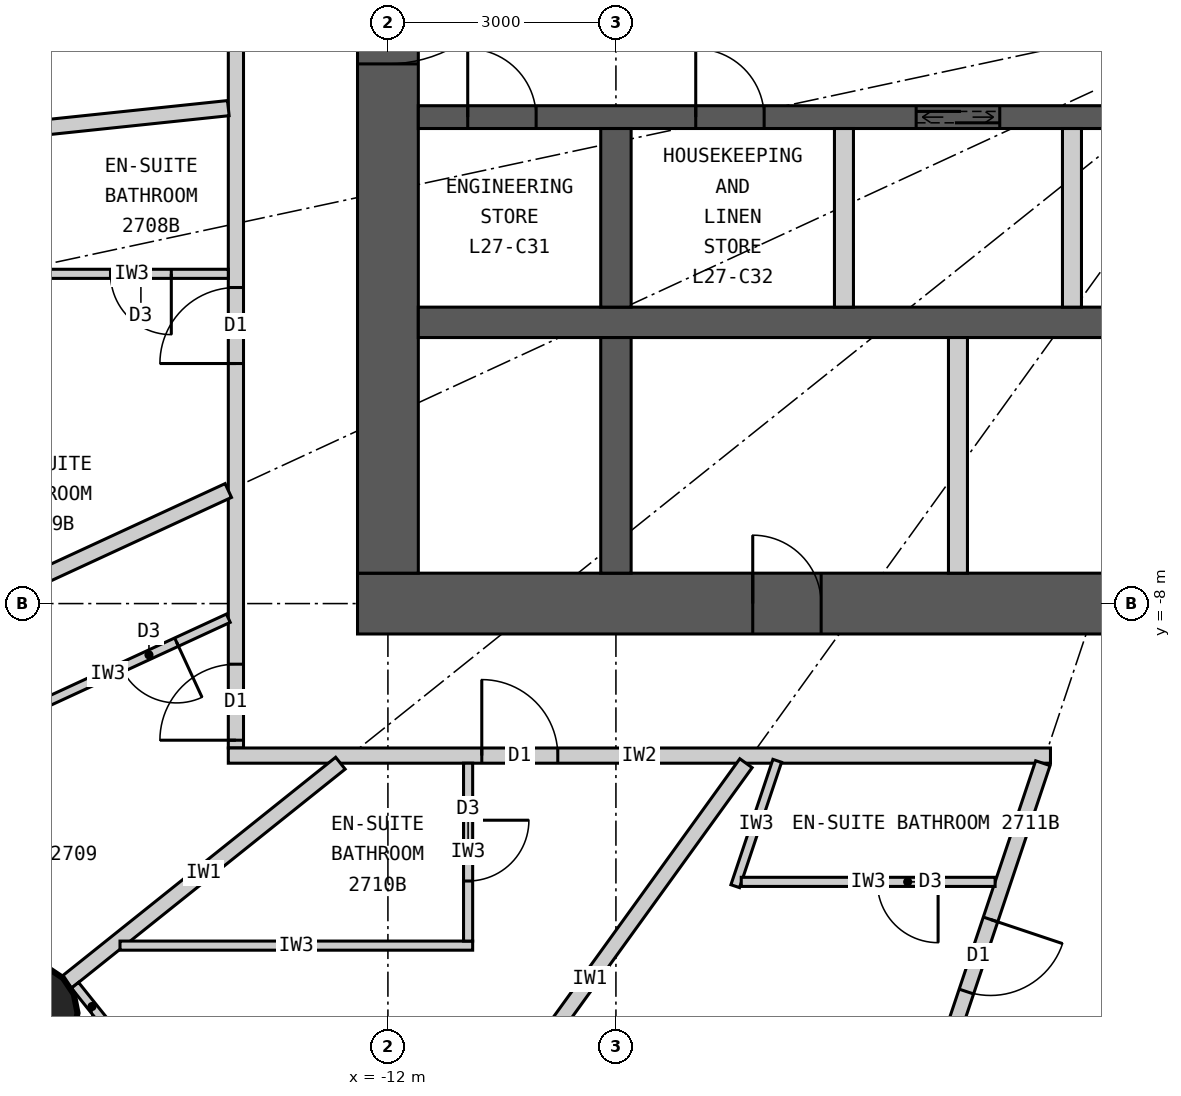
"""IFC4 building model, lengths in metres.
Left out: names, types, materials, properties, quantities, classifications, styles, units other than length and angle.
Written with IfcOpenShell. Run it as: python <this file> out.ifc"""

import sys

from ifc_helpers import new_model, si_unit, direction, frame, frame_2d, origin, origin_2d, place, context, subcontext, project, spatial, rectangle, circle, extrude, element, fill, save


model = new_model("IFC4")
c1 = context("Model", 3, precision=1e-05, world=origin(), true_north=direction((0.0, 1.0)))
c2 = subcontext(c1, "Body", "Model", "MODEL_VIEW")
j1 = project(units=[si_unit("LENGTHUNIT", "METRE"), si_unit("PLANEANGLEUNIT", "RADIAN")], contexts=[c1])
p1 = place(None, origin())
s1 = spatial("IfcSite", under=j1, at=p1, CompositionType="ELEMENT")
p2 = place(p1, origin())
s2 = spatial("IfcBuilding", under=s1, at=p2, CompositionType="ELEMENT")
p3 = place(p2, frame((0.0, 0.0, 108.9)))
s3 = spatial("IfcBuildingStorey", under=s2, at=p3, CompositionType="ELEMENT", Elevation=108.9)
p4 = place(p3, frame((-16.734, -13.387, 0.0), z_axis=(0.0, 0.0, 1.0), x_axis=(1.0, 0.0, 0.0)))
e1 = element("IfcColumn", 1, at=p4, inside=s3, PredefinedType="COLUMN", context=c2, shape_type="SweptSolid", body=[
    extrude(circle(Radius=0.65, at=origin_2d()), origin(), (0.0, 0.0, 1.0), 3.3),
])
p5 = place(p3, frame((12.4, -8.0, 0.0), z_axis=(0.0, 0.0, 1.0), x_axis=(-1.0, 0.0, 0.0)))
e2 = element("IfcWall", 2, at=p5, inside=s3, PredefinedType="SHEAR", context=c2, shape_type="SweptSolid", body=[
    extrude(rectangle(XDim=24.8, YDim=0.8, at=frame_2d((12.4, 0.0))), origin(), (0.0, 0.0, 1.0), 3.3),
])
p6 = place(p5, frame((11.1, 0.0, 0.0)))
e3 = element("IfcOpeningElement", 3, at=p6, cuts=e2, PredefinedType="OPENING", context=c2, shape_type="SweptSolid", body=[
    extrude(rectangle(XDim=1.2, YDim=2.2, at=frame_2d((0.6, 1.1))), frame((0.0, 0.41, 0.0), z_axis=(0.0, -1.0, 0.0), x_axis=(1.0, 0.0, 0.0)), (0.0, 0.0, 1.0), 0.82),
])
p7 = place(p5, frame((18.7, 0.0, 0.0)))
e4 = element("IfcOpeningElement", 4, at=p7, cuts=e2, PredefinedType="OPENING", context=c2, shape_type="SweptSolid", body=[
    extrude(rectangle(XDim=0.9, YDim=2.2, at=frame_2d((0.45, 1.1))), frame((0.0, 0.41, 0.0), z_axis=(0.0, -1.0, 0.0), x_axis=(1.0, 0.0, 0.0)), (0.0, 0.0, 1.0), 0.82),
])
p8 = place(p3, frame((-12.0, 7.6, 0.0), z_axis=(0.0, 0.0, 1.0), x_axis=(0.0, -1.0, 0.0)))
e5 = element("IfcWall", 5, at=p8, inside=s3, PredefinedType="SHEAR", context=c2, shape_type="SweptSolid", body=[
    extrude(rectangle(XDim=15.2, YDim=0.8, at=frame_2d((7.6, 0.0))), origin(), (0.0, 0.0, 1.0), 3.3),
])
p9 = place(p8, frame((6.7, 0.0, 0.0)))
e6 = element("IfcOpeningElement", 6, at=p9, cuts=e5, PredefinedType="OPENING", context=c2, shape_type="SweptSolid", body=[
    extrude(rectangle(XDim=1.8, YDim=2.2, at=frame_2d((0.9, 1.1))), frame((0.0, 0.41, 0.0), z_axis=(0.0, -1.0, 0.0), x_axis=(1.0, 0.0, 0.0)), (0.0, 0.0, 1.0), 0.82),
])
p10 = place(p3, frame((-11.6, -4.3, 0.0), z_axis=(0.0, 0.0, 1.0), x_axis=(1.0, 0.0, 0.0)))
e7 = element("IfcWall", 7, at=p10, inside=s3, PredefinedType="SHEAR", context=c2, shape_type="SweptSolid", body=[
    extrude(rectangle(XDim=23.2, YDim=0.4, at=frame_2d((11.6, 0.0))), origin(), (0.0, 0.0, 1.0), 3.3),
])
p11 = place(p3, frame((-11.6, -1.6, 0.0), z_axis=(0.0, 0.0, 1.0), x_axis=(1.0, 0.0, 0.0)))
e8 = element("IfcWall", 8, at=p11, inside=s3, PredefinedType="SHEAR", context=c2, shape_type="SweptSolid", body=[
    extrude(rectangle(XDim=23.2, YDim=0.3, at=frame_2d((11.6, 0.0))), origin(), (0.0, 0.0, 1.0), 3.3),
])
p12 = place(p11, frame((6.55, 0.0, 0.0)))
e9 = element("IfcOpeningElement", 9, at=p12, cuts=e8, PredefinedType="OPENING", context=c2, shape_type="SweptSolid", body=[
    extrude(rectangle(XDim=1.1, YDim=2.2, at=frame_2d((0.55, 1.1))), frame((0.0, 0.16, 0.0), z_axis=(0.0, -1.0, 0.0), x_axis=(1.0, 0.0, 0.0)), (0.0, 0.0, 1.0), 0.32),
])
p13 = place(p11, frame((15.3, 0.0, 0.0)))
e10 = element("IfcOpeningElement", 10, at=p13, cuts=e8, PredefinedType="OPENING", context=c2, shape_type="SweptSolid", body=[
    extrude(rectangle(XDim=1.6, YDim=2.4, at=frame_2d((0.8, 1.2))), frame((0.0, 0.16, 0.0), z_axis=(0.0, -1.0, 0.0), x_axis=(1.0, 0.0, 0.0)), (0.0, 0.0, 1.0), 0.32),
])
p14 = place(p11, frame((0.65, 0.0, 0.0)))
e11 = element("IfcOpeningElement", 11, at=p14, cuts=e8, PredefinedType="OPENING", context=c2, shape_type="SweptSolid", body=[
    extrude(rectangle(XDim=0.9, YDim=2.2, at=frame_2d((0.45, 1.1))), frame((0.0, 0.16, 0.0), z_axis=(0.0, -1.0, 0.0), x_axis=(1.0, 0.0, 0.0)), (0.0, 0.0, 1.0), 0.32),
])
p15 = place(p11, frame((3.65, 0.0, 0.0)))
e12 = element("IfcOpeningElement", 12, at=p15, cuts=e8, PredefinedType="OPENING", context=c2, shape_type="SweptSolid", body=[
    extrude(rectangle(XDim=0.9, YDim=2.2, at=frame_2d((0.45, 1.1))), frame((0.0, 0.16, 0.0), z_axis=(0.0, -1.0, 0.0), x_axis=(1.0, 0.0, 0.0)), (0.0, 0.0, 1.0), 0.32),
])
p16 = place(p11, frame((21.65, 0.0, 0.0)))
e13 = element("IfcOpeningElement", 13, at=p16, cuts=e8, PredefinedType="OPENING", context=c2, shape_type="SweptSolid", body=[
    extrude(rectangle(XDim=0.9, YDim=2.2, at=frame_2d((0.45, 1.1))), frame((0.0, 0.16, 0.0), z_axis=(0.0, -1.0, 0.0), x_axis=(1.0, 0.0, 0.0)), (0.0, 0.0, 1.0), 0.32),
])
p17 = place(p3, frame((-9.0, -4.1, 0.0), z_axis=(0.0, 0.0, 1.0), x_axis=(0.0, 1.0, 0.0)))
e14 = element("IfcWall", 14, at=p17, inside=s3, PredefinedType="SHEAR", context=c2, shape_type="SweptSolid", body=[
    extrude(rectangle(XDim=2.35, YDim=0.4, at=frame_2d((1.175, 0.0))), origin(), (0.0, 0.0, 1.0), 3.3),
])
p18 = place(p3, frame((-9.0, -7.6, 0.0), z_axis=(0.0, 0.0, 1.0), x_axis=(0.0, 1.0, 0.0)))
e15 = element("IfcWall", 15, at=p18, inside=s3, PredefinedType="SHEAR", context=c2, shape_type="SweptSolid", body=[
    extrude(rectangle(XDim=3.1, YDim=0.4, at=frame_2d((1.55, 0.0))), origin(), (0.0, 0.0, 1.0), 3.3),
])
p19 = place(p3, frame((-4.5, -7.6, 0.0), z_axis=(0.0, 0.0, 1.0), x_axis=(0.0, 1.0, 0.0)))
e16 = element("IfcWall", 16, at=p19, inside=s3, PredefinedType="PARTITIONING", context=c2, shape_type="SweptSolid", body=[
    extrude(rectangle(XDim=3.1, YDim=0.25, at=frame_2d((1.55, 0.0))), origin(), (0.0, 0.0, 1.0), 3.3),
])
for number, where, z_axis, x_axis in (
    (17, (-6.0, -4.1, 0.0), (0.0, 0.0, 1.0), (0.0, 1.0, 0.0)),
    (18, (-3.0, -4.1, 0.0), (0.0, 0.0, 1.0), (0.0, 1.0, 0.0)),
):
    element("IfcWall", number, at=place(p3, frame(where, z_axis=z_axis, x_axis=x_axis)), inside=s3, PredefinedType="PARTITIONING", context=c2, shape_type="SweptSolid", body=[
        extrude(rectangle(XDim=2.35, YDim=0.25, at=frame_2d((1.175, 0.0))), origin(), (0.0, 0.0, 1.0), 3.3),
    ])
p20 = place(p3, frame((-14.0, 9.9, 0.0), z_axis=(0.0, 0.0, 1.0), x_axis=(0.0, -1.0, 0.0)))
e19 = element("IfcWall", 19, at=p20, inside=s3, PredefinedType="PARTITIONING", context=c2, shape_type="SweptSolid", body=[
    extrude(rectangle(XDim=19.8, YDim=0.2, at=frame_2d((9.9, 0.0))), origin(), (0.0, 0.0, 1.0), 3.12),
])
p21 = place(p20, frame((3.622, 0.0, 0.0)))
e20 = element("IfcOpeningElement", 20, at=p21, cuts=e19, PredefinedType="OPENING", context=c2, shape_type="SweptSolid", body=[
    extrude(rectangle(XDim=1.0, YDim=2.2, at=frame_2d((0.5, 1.1))), frame((0.0, 0.11, 0.0), z_axis=(0.0, -1.0, 0.0), x_axis=(1.0, 0.0, 0.0)), (0.0, 0.0, 1.0), 0.22),
])
p22 = place(p20, frame((9.238, 0.0, 0.0)))
e21 = element("IfcOpeningElement", 21, at=p22, cuts=e19, PredefinedType="OPENING", context=c2, shape_type="SweptSolid", body=[
    extrude(rectangle(XDim=1.0, YDim=2.2, at=frame_2d((0.5, 1.1))), frame((0.0, 0.11, 0.0), z_axis=(0.0, -1.0, 0.0), x_axis=(1.0, 0.0, 0.0)), (0.0, 0.0, 1.0), 0.22),
])
p23 = place(p20, frame((13.742, 0.0, 0.0)))
e22 = element("IfcOpeningElement", 22, at=p23, cuts=e19, PredefinedType="OPENING", context=c2, shape_type="SweptSolid", body=[
    extrude(rectangle(XDim=1.0, YDim=2.2, at=frame_2d((0.5, 1.1))), frame((0.0, 0.11, 0.0), z_axis=(0.0, -1.0, 0.0), x_axis=(1.0, 0.0, 0.0)), (0.0, 0.0, 1.0), 0.22),
])
p24 = place(p20, frame((18.698, 0.0, 0.0)))
e23 = element("IfcOpeningElement", 23, at=p24, cuts=e19, PredefinedType="OPENING", context=c2, shape_type="SweptSolid", body=[
    extrude(rectangle(XDim=1.0, YDim=2.2, at=frame_2d((0.5, 1.1))), frame((0.0, 0.11, 0.0), z_axis=(0.0, -1.0, 0.0), x_axis=(1.0, 0.0, 0.0)), (0.0, 0.0, 1.0), 0.22),
])
p25 = place(p3, frame((-3.283, -10.0, 0.0), z_axis=(0.0, 0.0, 1.0), x_axis=(-1.0, 0.0, 0.0)))
e24 = element("IfcWall", 24, at=p25, inside=s3, PredefinedType="PARTITIONING", context=c2, shape_type="SweptSolid", body=[
    extrude(rectangle(XDim=10.817, YDim=0.2, at=frame_2d((5.409, 0.0))), origin(), (0.0, 0.0, 1.0), 3.12),
])
p26 = place(p25, frame((6.482, 0.0, 0.0)))
e25 = element("IfcOpeningElement", 25, at=p26, cuts=e24, PredefinedType="OPENING", context=c2, shape_type="SweptSolid", body=[
    extrude(rectangle(XDim=1.0, YDim=2.2, at=frame_2d((0.5, 1.1))), frame((0.0, 0.11, 0.0), z_axis=(0.0, -1.0, 0.0), x_axis=(1.0, 0.0, 0.0)), (0.0, 0.0, 1.0), 0.22),
])
p27 = place(p3, frame((-14.1, -1.482, 0.0), z_axis=(0.0, 0.0, 1.0), x_axis=(-0.994523202615, -0.104516024894, 0.0)))
e26 = element("IfcWall", 26, at=p27, inside=s3, PredefinedType="PARTITIONING", context=c2, shape_type="SweptSolid", body=[
    extrude(rectangle(XDim=10.091, YDim=0.2, at=frame_2d((5.045, 0.0))), origin(), (0.0, 0.0, 1.0), 2.47),
])
p28 = place(p3, frame((-14.1, -6.512, 0.0), z_axis=(0.0, 0.0, 1.0), x_axis=(-0.907833019998, -0.419331858797, 0.0)))
e27 = element("IfcWall", 27, at=p28, inside=s3, PredefinedType="PARTITIONING", context=c2, shape_type="SweptSolid", body=[
    extrude(rectangle(XDim=6.505, YDim=0.2, at=frame_2d((3.252, 0.0))), origin(), (0.0, 0.0, 1.0), 2.27),
])
p29 = place(p3, frame((-12.625, -10.1, 0.0), z_axis=(0.0, 0.0, 1.0), x_axis=(-0.780863644897, -0.624701503182, 0.0)))
e28 = element("IfcWall", 28, at=p29, inside=s3, PredefinedType="PARTITIONING", context=c2, shape_type="SweptSolid", body=[
    extrude(rectangle(XDim=4.612, YDim=0.2, at=frame_2d((2.306, 0.0))), origin(), (0.0, 0.0, 1.0), 2.37),
])
p30 = place(p3, frame((-7.289, -10.1, 0.0), z_axis=(0.0, 0.0, 1.0), x_axis=(-0.585217367024, -0.81087645997, 0.0)))
e29 = element("IfcWall", 29, at=p30, inside=s3, PredefinedType="PARTITIONING", context=c2, shape_type="SweptSolid", body=[
    extrude(rectangle(XDim=7.016, YDim=0.2, at=frame_2d((3.508, 0.0))), origin(), (0.0, 0.0, 1.0), 2.37),
])
p31 = place(p3, frame((-3.383, -10.1, 0.0), z_axis=(0.0, 0.0, 1.0), x_axis=(-0.317603705574, -0.948223542318, 0.0)))
e30 = element("IfcWall", 30, at=p31, inside=s3, PredefinedType="PARTITIONING", context=c2, shape_type="SweptSolid", body=[
    extrude(rectangle(XDim=7.823, YDim=0.2, at=frame_2d((3.912, 0.0))), origin(), (0.0, 0.0, 1.0), 2.37),
])
p32 = place(p31, frame((2.168, 0.0, 0.0)))
e31 = element("IfcOpeningElement", 31, at=p32, cuts=e30, PredefinedType="OPENING", context=c2, shape_type="SweptSolid", body=[
    extrude(rectangle(XDim=1.0, YDim=2.2, at=frame_2d((0.5, 1.1))), frame((0.0, 0.11, 0.0), z_axis=(0.0, -1.0, 0.0), x_axis=(1.0, 0.0, 0.0)), (0.0, 0.0, 1.0), 0.22),
])
p33 = place(p3, frame((-1.665, -10.1, 0.0), z_axis=(0.0, 0.0, 1.0), x_axis=(-0.162660519103, -0.986682094459, 0.0)))
e32 = element("IfcWall", 32, at=p33, inside=s3, PredefinedType="PARTITIONING", context=c2, shape_type="SweptSolid", body=[
    extrude(rectangle(XDim=9.111, YDim=0.2, at=frame_2d((4.555, 0.0))), origin(), (0.0, 0.0, 1.0), 3.12),
])
p34 = place(p33, frame((1.86, 0.0, 0.0)))
e33 = element("IfcOpeningElement", 33, at=p34, cuts=e32, PredefinedType="OPENING", context=c2, shape_type="SweptSolid", body=[
    extrude(rectangle(XDim=1.0, YDim=2.2, at=frame_2d((0.5, 1.1))), frame((0.0, 0.11, 0.0), z_axis=(0.0, -1.0, 0.0), x_axis=(1.0, 0.0, 0.0)), (0.0, 0.0, 1.0), 0.22),
])
p35 = place(p3, frame((-14.1, -3.662, 0.0), z_axis=(0.0, 0.0, 1.0), x_axis=(-1.0, 0.0, 0.0)))
e34 = element("IfcWall", 34, at=p35, inside=s3, PredefinedType="PARTITIONING", context=c2, shape_type="SweptSolid", body=[
    extrude(rectangle(XDim=2.54, YDim=0.12, at=frame_2d((1.27, 0.0))), origin(), (0.0, 0.0, 1.0), 2.37),
])
p36 = place(p35, frame((0.75, 0.0, 0.0)))
e35 = element("IfcOpeningElement", 35, at=p36, cuts=e34, PredefinedType="OPENING", context=c2, shape_type="SweptSolid", body=[
    extrude(rectangle(XDim=0.8, YDim=2.1, at=frame_2d((0.4, 1.05))), frame((0.0, 0.07, 0.0), z_axis=(0.0, -1.0, 0.0), x_axis=(1.0, 0.0, 0.0)), (0.0, 0.0, 1.0), 0.14),
])
p37 = place(p3, frame((-14.1, -8.193, 0.0), z_axis=(0.0, 0.0, 1.0), x_axis=(-0.907836493557, -0.419324338628, 0.0)))
e36 = element("IfcWall", 36, at=p37, inside=s3, PredefinedType="PARTITIONING", context=c2, shape_type="SweptSolid", body=[
    extrude(rectangle(XDim=3.49, YDim=0.12, at=frame_2d((1.745, 0.0))), origin(), (0.0, 0.0, 1.0), 3.12),
])
p38 = place(p37, frame((0.75, 0.0, 0.0)))
e37 = element("IfcOpeningElement", 37, at=p38, cuts=e36, PredefinedType="OPENING", context=c2, shape_type="SweptSolid", body=[
    extrude(rectangle(XDim=0.8, YDim=2.1, at=frame_2d((0.4, 1.05))), frame((0.0, 0.07, 0.0), z_axis=(0.0, -1.0, 0.0), x_axis=(1.0, 0.0, 0.0)), (0.0, 0.0, 1.0), 0.14),
])
p39 = place(p3, frame((-15.525, -12.5, 0.0), z_axis=(0.0, 0.0, 1.0), x_axis=(1.0, 0.0, 0.0)))
e38 = element("IfcWall", 38, at=p39, inside=s3, PredefinedType="PARTITIONING", context=c2, shape_type="SweptSolid", body=[
    extrude(rectangle(XDim=4.64, YDim=0.12, at=frame_2d((2.32, 0.0))), origin(), (0.0, 0.0, 1.0), 3.12),
])
p40 = place(p3, frame((-10.945, -10.1, 0.0), z_axis=(0.0, 0.0, 1.0), x_axis=(0.0, -1.0, 0.0)))
e39 = element("IfcWall", 39, at=p40, inside=s3, PredefinedType="PARTITIONING", context=c2, shape_type="SweptSolid", body=[
    extrude(rectangle(XDim=2.34, YDim=0.12, at=frame_2d((1.17, 0.0))), origin(), (0.0, 0.0, 1.0), 3.12),
])
p41 = place(p40, frame((0.75, 0.0, 0.0)))
e40 = element("IfcOpeningElement", 40, at=p41, cuts=e39, PredefinedType="OPENING", context=c2, shape_type="SweptSolid", body=[
    extrude(rectangle(XDim=0.8, YDim=2.1, at=frame_2d((0.4, 1.05))), frame((0.0, 0.07, 0.0), z_axis=(0.0, -1.0, 0.0), x_axis=(1.0, 0.0, 0.0)), (0.0, 0.0, 1.0), 0.14),
])
p42 = place(p3, frame((-6.878, -10.068, 0.0), z_axis=(0.0, 0.0, 1.0), x_axis=(-0.317532394508, -0.948247424694, 0.0)))
e41 = element("IfcWall", 41, at=p42, inside=s3, PredefinedType="PARTITIONING", context=c2, shape_type="SweptSolid", body=[
    extrude(rectangle(XDim=1.74, YDim=0.12, at=frame_2d((0.87, 0.0))), origin(), (0.0, 0.0, 1.0), 3.12),
])
p43 = place(p3, frame((-4.011, -11.661, 0.0), z_axis=(0.0, 0.0, 1.0), x_axis=(-1.0, 0.0, 0.0)))
e42 = element("IfcWall", 42, at=p43, inside=s3, PredefinedType="PARTITIONING", context=c2, shape_type="SweptSolid", body=[
    extrude(rectangle(XDim=3.34, YDim=0.12, at=frame_2d((1.67, 0.0))), origin(), (0.0, 0.0, 1.0), 3.12),
])
p44 = place(p43, frame((0.75, 0.0, 0.0)))
e43 = element("IfcOpeningElement", 43, at=p44, cuts=e42, PredefinedType="OPENING", context=c2, shape_type="SweptSolid", body=[
    extrude(rectangle(XDim=0.8, YDim=2.1, at=frame_2d((0.4, 1.05))), frame((0.0, 0.07, 0.0), z_axis=(0.0, -1.0, 0.0), x_axis=(1.0, 0.0, 0.0)), (0.0, 0.0, 1.0), 0.14),
])
p45 = place(p3, frame((-16.117, -13.022, 0.0), z_axis=(0.0, 0.0, 1.0), x_axis=(0.62465344249, -0.780902091677, 0.0)))
e44 = element("IfcWall", 44, at=p45, inside=s3, PredefinedType="PARTITIONING", context=c2, shape_type="SweptSolid", body=[
    extrude(rectangle(XDim=0.716, YDim=0.12, at=frame_2d((0.358, 0.0))), origin(), (0.0, 0.0, 1.0), 3.12),
])
p46 = place(p36, origin())
e45 = element("IfcDoor", 45, at=p46, inside=s3, OperationType="SINGLE_SWING_LEFT", PredefinedType="DOOR", context=c2, shape_type="SweptSolid", body=[
    extrude(rectangle(XDim=0.8, YDim=2.1, at=frame_2d((0.4, 1.05))), frame((0.0, 0.025, 0.0), z_axis=(0.0, -1.0, 0.0), x_axis=(1.0, 0.0, 0.0)), (0.0, 0.0, 1.0), 0.05),
])
fill(e35, e45)
p47 = place(p23, origin())
e46 = element("IfcDoor", 46, at=p47, inside=s3, OperationType="SINGLE_SWING_RIGHT", PredefinedType="DOOR", context=c2, shape_type="SweptSolid", body=[
    extrude(rectangle(XDim=1.0, YDim=2.2, at=frame_2d((0.5, 1.1))), frame((0.0, 0.025, 0.0), z_axis=(0.0, -1.0, 0.0), x_axis=(1.0, 0.0, 0.0)), (0.0, 0.0, 1.0), 0.05),
])
fill(e22, e46)
p48 = place(p38, origin())
e47 = element("IfcDoor", 47, at=p48, inside=s3, OperationType="SINGLE_SWING_LEFT", PredefinedType="DOOR", context=c2, shape_type="SweptSolid", body=[
    extrude(rectangle(XDim=0.8, YDim=2.1, at=frame_2d((0.4, 1.05))), frame((0.0, 0.025, 0.0), z_axis=(0.0, -1.0, 0.0), x_axis=(1.0, 0.0, 0.0)), (0.0, 0.0, 1.0), 0.05),
])
fill(e37, e47)
p49 = place(p24, origin())
e48 = element("IfcDoor", 48, at=p49, inside=s3, OperationType="SINGLE_SWING_RIGHT", PredefinedType="DOOR", context=c2, shape_type="SweptSolid", body=[
    extrude(rectangle(XDim=1.0, YDim=2.2, at=frame_2d((0.5, 1.1))), frame((0.0, 0.025, 0.0), z_axis=(0.0, -1.0, 0.0), x_axis=(1.0, 0.0, 0.0)), (0.0, 0.0, 1.0), 0.05),
])
fill(e23, e48)
p50 = place(p41, origin())
e49 = element("IfcDoor", 49, at=p50, inside=s3, OperationType="SINGLE_SWING_LEFT", PredefinedType="DOOR", context=c2, shape_type="SweptSolid", body=[
    extrude(rectangle(XDim=0.8, YDim=2.1, at=frame_2d((0.4, 1.05))), frame((0.0, 0.025, 0.0), z_axis=(0.0, -1.0, 0.0), x_axis=(1.0, 0.0, 0.0)), (0.0, 0.0, 1.0), 0.05),
])
fill(e40, e49)
p51 = place(p26, origin())
e50 = element("IfcDoor", 50, at=p51, inside=s3, OperationType="SINGLE_SWING_RIGHT", PredefinedType="DOOR", context=c2, shape_type="SweptSolid", body=[
    extrude(rectangle(XDim=1.0, YDim=2.2, at=frame_2d((0.5, 1.1))), frame((0.0, 0.025, 0.0), z_axis=(0.0, -1.0, 0.0), x_axis=(1.0, 0.0, 0.0)), (0.0, 0.0, 1.0), 0.05),
])
fill(e25, e50)
p52 = place(p44, origin())
e51 = element("IfcDoor", 51, at=p52, inside=s3, OperationType="SINGLE_SWING_LEFT", PredefinedType="DOOR", context=c2, shape_type="SweptSolid", body=[
    extrude(rectangle(XDim=0.8, YDim=2.1, at=frame_2d((0.4, 1.05))), frame((0.0, 0.025, 0.0), z_axis=(0.0, -1.0, 0.0), x_axis=(1.0, 0.0, 0.0)), (0.0, 0.0, 1.0), 0.05),
])
fill(e43, e51)
p53 = place(p32, origin())
e52 = element("IfcDoor", 52, at=p53, inside=s3, OperationType="SINGLE_SWING_LEFT", PredefinedType="DOOR", context=c2, shape_type="SweptSolid", body=[
    extrude(rectangle(XDim=1.0, YDim=2.2, at=frame_2d((0.5, 1.1))), frame((0.0, 0.025, 0.0), z_axis=(0.0, -1.0, 0.0), x_axis=(1.0, 0.0, 0.0)), (0.0, 0.0, 1.0), 0.05),
])
fill(e31, e52)
p54 = place(p7, origin())
e53 = element("IfcDoor", 53, at=p54, inside=s3, OperationType="SINGLE_SWING_RIGHT", PredefinedType="DOOR", context=c2, shape_type="SweptSolid", body=[
    extrude(rectangle(XDim=0.9, YDim=2.2, at=frame_2d((0.45, 1.1))), frame((0.0, 0.025, 0.0), z_axis=(0.0, -1.0, 0.0), x_axis=(1.0, 0.0, 0.0)), (0.0, 0.0, 1.0), 0.05),
])
fill(e4, e53)
p55 = place(p12, origin())
e54 = element("IfcDoor", 54, at=p55, inside=s3, OperationType="DOUBLE_DOOR_SLIDING", PredefinedType="DOOR", context=c2, shape_type="SweptSolid", body=[
    extrude(rectangle(XDim=1.1, YDim=2.2, at=frame_2d((0.55, 1.1))), frame((0.0, 0.025, 0.0), z_axis=(0.0, -1.0, 0.0), x_axis=(1.0, 0.0, 0.0)), (0.0, 0.0, 1.0), 0.05),
])
fill(e9, e54)
p56 = place(p14, origin())
e55 = element("IfcDoor", 55, at=p56, inside=s3, OperationType="SINGLE_SWING_LEFT", PredefinedType="DOOR", context=c2, shape_type="SweptSolid", body=[
    extrude(rectangle(XDim=0.9, YDim=2.2, at=frame_2d((0.45, 1.1))), frame((0.0, 0.025, 0.0), z_axis=(0.0, -1.0, 0.0), x_axis=(1.0, 0.0, 0.0)), (0.0, 0.0, 1.0), 0.05),
])
fill(e11, e55)
p57 = place(p15, origin())
e56 = element("IfcDoor", 56, at=p57, inside=s3, OperationType="SINGLE_SWING_LEFT", PredefinedType="DOOR", context=c2, shape_type="SweptSolid", body=[
    extrude(rectangle(XDim=0.9, YDim=2.2, at=frame_2d((0.45, 1.1))), frame((0.0, 0.025, 0.0), z_axis=(0.0, -1.0, 0.0), x_axis=(1.0, 0.0, 0.0)), (0.0, 0.0, 1.0), 0.05),
])
fill(e12, e56)
p58 = place(p9, origin())
e57 = element("IfcDoor", 57, at=p58, inside=s3, OperationType="DOUBLE_DOOR_DOUBLE_SWING", PredefinedType="DOOR", context=c2, shape_type="SweptSolid", body=[
    extrude(rectangle(XDim=1.8, YDim=2.2, at=frame_2d((0.9, 1.1))), frame((0.0, 0.025, 0.0), z_axis=(0.0, -1.0, 0.0), x_axis=(1.0, 0.0, 0.0)), (0.0, 0.0, 1.0), 0.05),
])
fill(e6, e57)
save(model, sys.argv[1])
